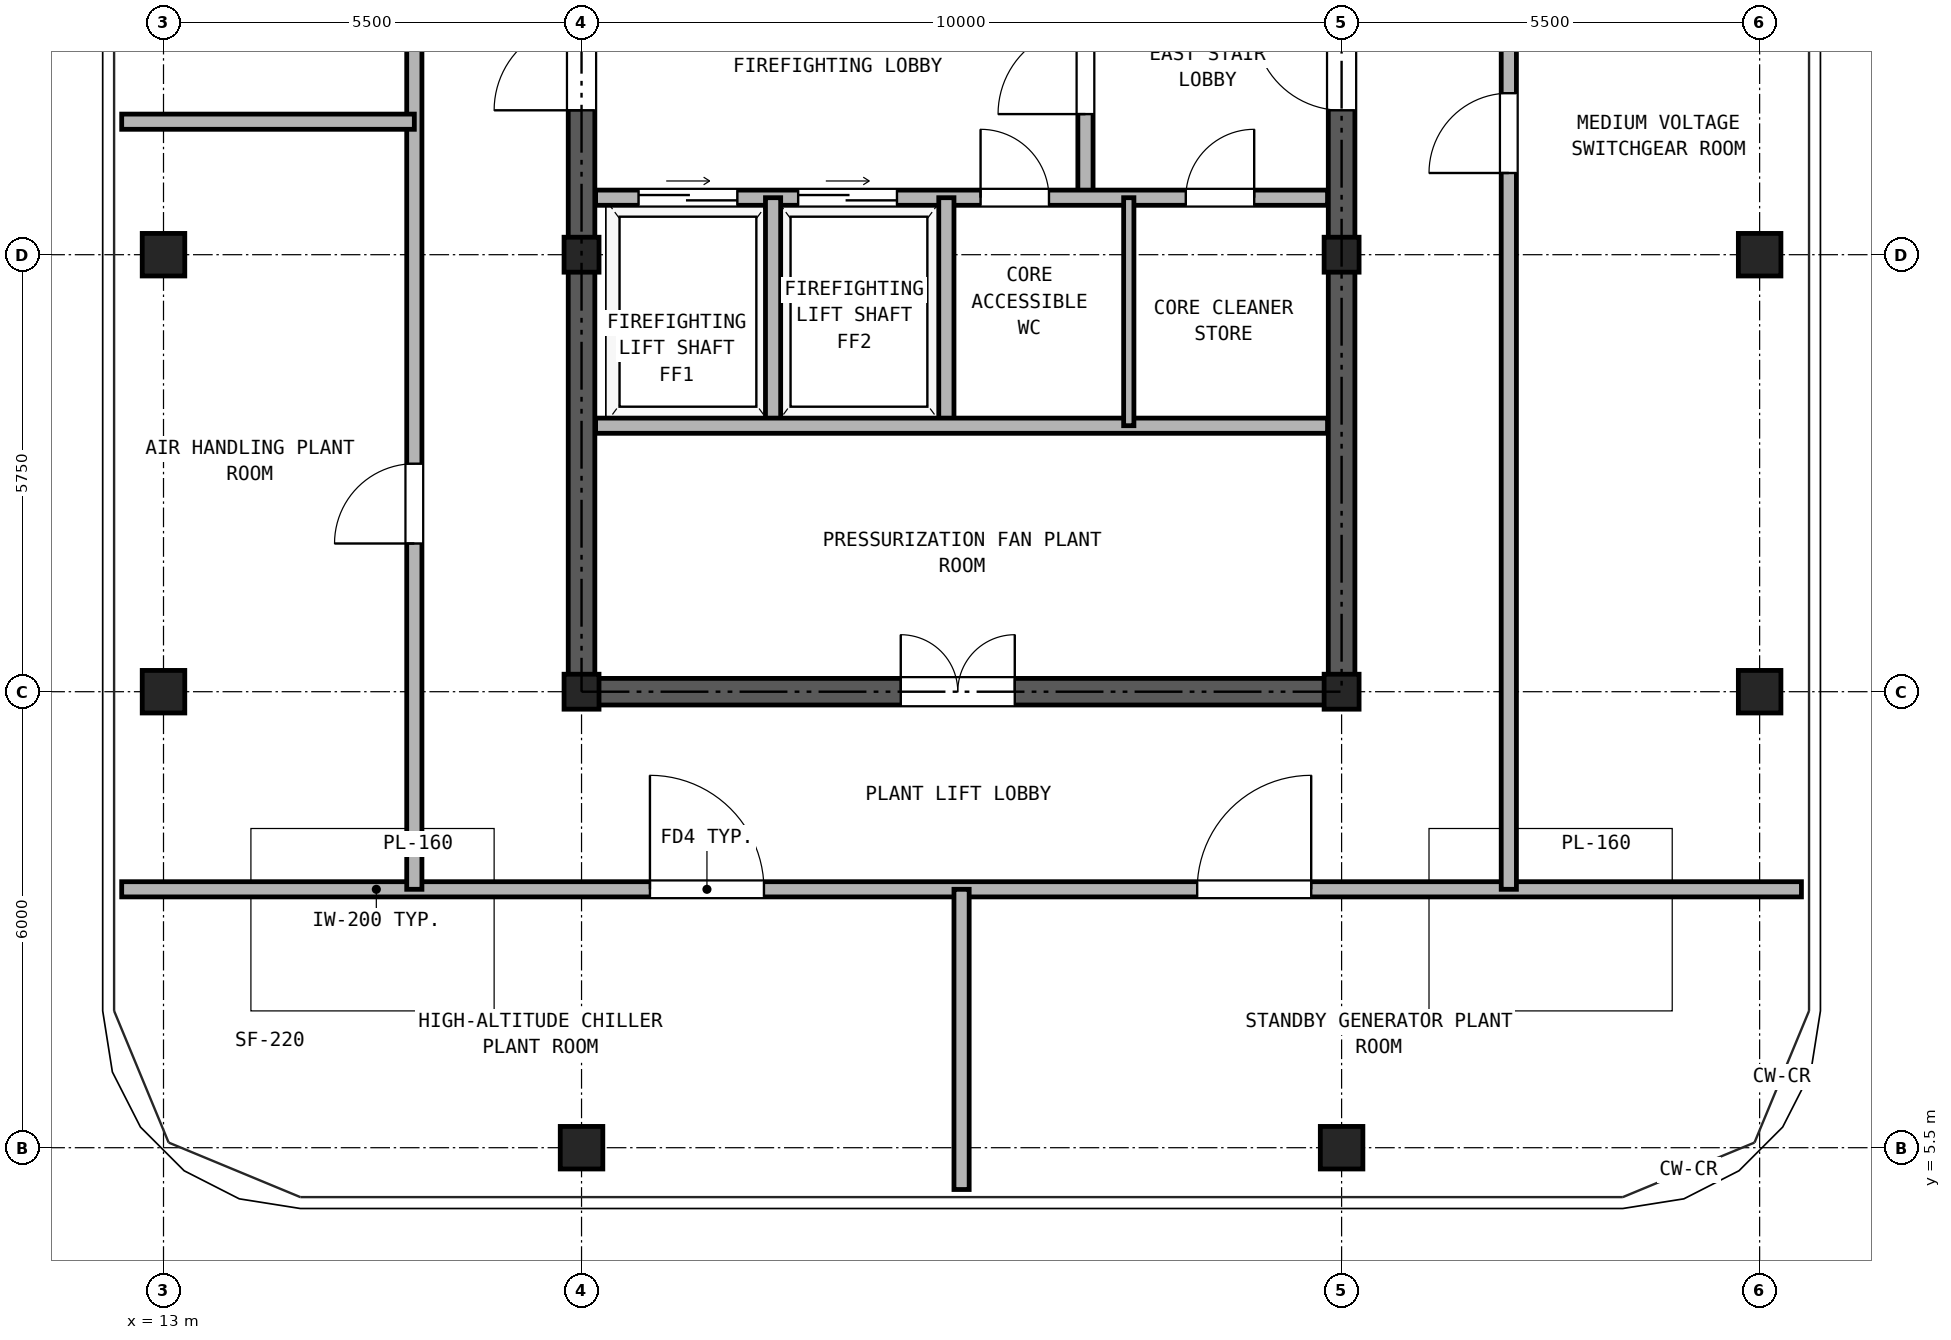
"""IFC4 building model, lengths in metres.
Left out: names, types, materials, properties, quantities, classifications, styles, units other than length and angle.
Written with IfcOpenShell. Run it as: python <this file> out.ifc"""

import sys

from ifc_helpers import new_model, si_unit, direction, frame, frame_2d, origin, origin_2d, place, context, subcontext, project, spatial, rectangle, hollow_rectangle, extrude, source, transform, mapped, element, fill, save


model = new_model("IFC4")
c1 = context("Model", 3, precision=1e-05, world=origin(), true_north=direction((0.0, 1.0)))
c2 = subcontext(c1, "Body", "Model", "MODEL_VIEW")
j1 = project(units=[si_unit("LENGTHUNIT", "METRE"), si_unit("PLANEANGLEUNIT", "RADIAN")], contexts=[c1])
p1 = place(None, origin())
s1 = spatial("IfcSite", under=j1, at=p1, CompositionType="ELEMENT")
p2 = place(p1, origin())
s2 = spatial("IfcBuilding", under=s1, at=p2, CompositionType="ELEMENT")
p3 = place(p2, frame((0.0, 0.0, 289.3)))
s3 = spatial("IfcBuildingStorey", under=s2, at=p3, CompositionType="ELEMENT", Elevation=289.3)
m1 = source(origin(), c2, "Body", "SweptSolid", [
    extrude(hollow_rectangle(XDim=0.56, YDim=0.56, WallThickness=0.03, at=origin_2d()), origin(), (0.0, 0.0, 1.0), 3.38),
])
for number, where, z_axis, x_axis in (
    (1, (18.5, 5.5, 0.0), (0.0, 0.0, 1.0), (1.0, 0.0, 0.0)),
    (2, (28.5, 5.5, 0.0), (0.0, 0.0, 1.0), (1.0, 0.0, 0.0)),
    (3, (13.0, 11.5, 0.0), (0.0, 0.0, 1.0), (1.0, 0.0, 0.0)),
    (4, (34.0, 11.5, 0.0), (0.0, 0.0, 1.0), (1.0, 0.0, 0.0)),
    (5, (13.0, 17.25, 0.0), (0.0, 0.0, 1.0), (1.0, 0.0, 0.0)),
    (6, (34.0, 17.25, 0.0), (0.0, 0.0, 1.0), (1.0, 0.0, 0.0)),
):
    element("IfcColumn", number, at=place(p3, frame(where, z_axis=z_axis, x_axis=x_axis)), inside=s3, PredefinedType="COLUMN", context=c2, shape_type="MappedRepresentation", body=[
        mapped(m1, transform((0.0, 0.0, 0.0), x_axis=(1.0, 0.0, 0.0), y_axis=(0.0, 1.0, 0.0), z_axis=(0.0, 0.0, 1.0), scale=1.0)),
    ])
m2 = source(origin(), c2, "Body", "SweptSolid", [
    extrude(hollow_rectangle(XDim=0.46, YDim=0.46, WallThickness=0.025, at=origin_2d()), origin(), (0.0, 0.0, 1.0), 3.38),
])
for number, where, z_axis, x_axis in (
    (7, (18.5, 11.5, 0.0), (0.0, 0.0, 1.0), (1.0, 0.0, 0.0)),
    (8, (18.5, 17.25, 0.0), (0.0, 0.0, 1.0), (1.0, 0.0, 0.0)),
    (9, (28.5, 11.5, 0.0), (0.0, 0.0, 1.0), (1.0, 0.0, 0.0)),
    (10, (28.5, 17.25, 0.0), (0.0, 0.0, 1.0), (1.0, 0.0, 0.0)),
):
    element("IfcColumn", number, at=place(p3, frame(where, z_axis=z_axis, x_axis=x_axis)), inside=s3, PredefinedType="COLUMN", context=c2, shape_type="MappedRepresentation", body=[
        mapped(m2, transform((0.0, 0.0, 0.0), x_axis=(1.0, 0.0, 0.0), y_axis=(0.0, 1.0, 0.0), z_axis=(0.0, 0.0, 1.0), scale=1.0)),
    ])
p4 = place(p3, frame((18.325, 11.5, 0.0), z_axis=(0.0, 0.0, 1.0), x_axis=(1.0, 0.0, 0.0)))
e11 = element("IfcWall", 11, at=p4, inside=s3, PredefinedType="SHEAR", context=c2, shape_type="SweptSolid", body=[
    extrude(rectangle(XDim=10.35, YDim=0.35, at=frame_2d((5.175, 0.0))), origin(), (0.0, 0.0, 1.0), 3.38),
])
p5 = place(p4, frame((4.375, 0.0, 0.0)))
e12 = element("IfcOpeningElement", 12, at=p5, cuts=e11, PredefinedType="OPENING", context=c2, shape_type="SweptSolid", body=[
    extrude(rectangle(XDim=1.5, YDim=2.25, at=frame_2d((0.75, 1.125))), frame((0.0, 0.185, 0.0), z_axis=(0.0, -1.0, 0.0), x_axis=(1.0, 0.0, 0.0)), (0.0, 0.0, 1.0), 0.37),
])
p6 = place(p3, frame((18.5, 11.675, 0.0), z_axis=(0.0, 0.0, 1.0), x_axis=(0.0, 1.0, 0.0)))
e13 = element("IfcWall", 13, at=p6, inside=s3, PredefinedType="SHEAR", context=c2, shape_type="SweptSolid", body=[
    extrude(rectangle(XDim=16.9, YDim=0.35, at=frame_2d((8.45, 0.0))), origin(), (0.0, 0.0, 1.0), 3.38),
])
p7 = place(p6, frame((7.475, 0.0, 0.0)))
e14 = element("IfcOpeningElement", 14, at=p7, cuts=e13, PredefinedType="OPENING", context=c2, shape_type="SweptSolid", body=[
    extrude(rectangle(XDim=1.15, YDim=2.2, at=frame_2d((0.575, 1.1))), frame((0.0, 0.185, 0.0), z_axis=(0.0, -1.0, 0.0), x_axis=(1.0, 0.0, 0.0)), (0.0, 0.0, 1.0), 0.37),
])
p8 = place(p3, frame((28.5, 11.675, 0.0), z_axis=(0.0, 0.0, 1.0), x_axis=(0.0, 1.0, 0.0)))
e15 = element("IfcWall", 15, at=p8, inside=s3, PredefinedType="SHEAR", context=c2, shape_type="SweptSolid", body=[
    extrude(rectangle(XDim=16.9, YDim=0.35, at=frame_2d((8.45, 0.0))), origin(), (0.0, 0.0, 1.0), 3.38),
])
p9 = place(p8, frame((7.475, 0.0, 0.0)))
e16 = element("IfcOpeningElement", 16, at=p9, cuts=e15, PredefinedType="OPENING", context=c2, shape_type="SweptSolid", body=[
    extrude(rectangle(XDim=1.15, YDim=2.2, at=frame_2d((0.575, 1.1))), frame((0.0, 0.185, 0.0), z_axis=(0.0, -1.0, 0.0), x_axis=(1.0, 0.0, 0.0)), (0.0, 0.0, 1.0), 0.37),
])
p10 = place(p3, frame((25.13, 18.0, 0.0), z_axis=(0.0, 0.0, 1.0), x_axis=(0.0, 1.0, 0.0)))
e17 = element("IfcWall", 17, at=p10, inside=s3, PredefinedType="PARTITIONING", context=c2, shape_type="SweptSolid", body=[
    extrude(rectangle(XDim=3.39, YDim=0.2, at=frame_2d((1.695, 0.0))), origin(), (0.0, 0.0, 1.0), 3.38),
])
p11 = place(p10, frame((1.1, 0.0, 0.0)))
e18 = element("IfcOpeningElement", 18, at=p11, cuts=e17, PredefinedType="OPENING", context=c2, shape_type="SweptSolid", body=[
    extrude(rectangle(XDim=1.15, YDim=2.2, at=frame_2d((0.575, 1.1))), frame((0.0, 0.11, 0.0), z_axis=(0.0, -1.0, 0.0), x_axis=(1.0, 0.0, 0.0)), (0.0, 0.0, 1.0), 0.22),
])
p12 = place(p3, frame((18.685, 18.0, 0.0), z_axis=(0.0, 0.0, 1.0), x_axis=(1.0, 0.0, 0.0)))
e19 = element("IfcWall", 19, at=p12, inside=s3, PredefinedType="PARTITIONING", context=c2, shape_type="SweptSolid", body=[
    extrude(rectangle(XDim=9.63, YDim=0.2, at=frame_2d((4.815, 0.0))), origin(), (0.0, 0.0, 1.0), 3.38),
])
p13 = place(p12, frame((0.565, 0.0, 0.0)))
e20 = element("IfcOpeningElement", 20, at=p13, cuts=e19, PredefinedType="OPENING", context=c2, shape_type="SweptSolid", body=[
    extrude(rectangle(XDim=1.3, YDim=2.3, at=frame_2d((0.65, 1.15))), frame((0.0, 0.11, 0.0), z_axis=(0.0, -1.0, 0.0), x_axis=(1.0, 0.0, 0.0)), (0.0, 0.0, 1.0), 0.22),
])
p14 = place(p12, frame((2.665, 0.0, 0.0)))
e21 = element("IfcOpeningElement", 21, at=p14, cuts=e19, PredefinedType="OPENING", context=c2, shape_type="SweptSolid", body=[
    extrude(rectangle(XDim=1.3, YDim=2.3, at=frame_2d((0.65, 1.15))), frame((0.0, 0.11, 0.0), z_axis=(0.0, -1.0, 0.0), x_axis=(1.0, 0.0, 0.0)), (0.0, 0.0, 1.0), 0.22),
])
p15 = place(p12, frame((5.065, 0.0, 0.0)))
e22 = element("IfcOpeningElement", 22, at=p15, cuts=e19, PredefinedType="OPENING", context=c2, shape_type="SweptSolid", body=[
    extrude(rectangle(XDim=0.9, YDim=2.05, at=frame_2d((0.45, 1.025))), frame((0.0, 0.11, 0.0), z_axis=(0.0, -1.0, 0.0), x_axis=(1.0, 0.0, 0.0)), (0.0, 0.0, 1.0), 0.22),
])
p16 = place(p12, frame((7.765, 0.0, 0.0)))
e23 = element("IfcOpeningElement", 23, at=p16, cuts=e19, PredefinedType="OPENING", context=c2, shape_type="SweptSolid", body=[
    extrude(rectangle(XDim=0.9, YDim=2.05, at=frame_2d((0.45, 1.025))), frame((0.0, 0.11, 0.0), z_axis=(0.0, -1.0, 0.0), x_axis=(1.0, 0.0, 0.0)), (0.0, 0.0, 1.0), 0.22),
])
for number, where, z_axis, x_axis in (
    (24, (21.02, 15.0, 0.0), (0.0, 0.0, 1.0), (0.0, 1.0, 0.0)),
    (25, (23.3, 15.0, 0.0), (0.0, 0.0, 1.0), (0.0, 1.0, 0.0)),
):
    element("IfcWall", number, at=place(p3, frame(where, z_axis=z_axis, x_axis=x_axis)), inside=s3, PredefinedType="PARTITIONING", context=c2, shape_type="SweptSolid", body=[
        extrude(rectangle(XDim=3.0, YDim=0.2, at=frame_2d((1.5, 0.0))), origin(), (0.0, 0.0, 1.0), 3.38),
    ])
p17 = place(p3, frame((18.685, 15.0, 0.0), z_axis=(0.0, 0.0, 1.0), x_axis=(1.0, 0.0, 0.0)))
e26 = element("IfcWall", 26, at=p17, inside=s3, PredefinedType="PARTITIONING", context=c2, shape_type="SweptSolid", body=[
    extrude(rectangle(XDim=9.63, YDim=0.2, at=frame_2d((4.815, 0.0))), origin(), (0.0, 0.0, 1.0), 3.38),
])
p18 = place(p3, frame((25.7, 15.0, 0.0), z_axis=(0.0, 0.0, 1.0), x_axis=(0.0, 1.0, 0.0)))
e27 = element("IfcWall", 27, at=p18, inside=s3, PredefinedType="PARTITIONING", context=c2, shape_type="SweptSolid", body=[
    extrude(rectangle(XDim=3.0, YDim=0.135, at=frame_2d((1.5, 0.0))), origin(), (0.0, 0.0, 1.0), 3.38),
])
p19 = place(p3, frame((12.45, 8.9, 0.0), z_axis=(0.0, 0.0, 1.0), x_axis=(1.0, 0.0, 0.0)))
e28 = element("IfcWall", 28, at=p19, inside=s3, PredefinedType="PARTITIONING", context=c2, shape_type="SweptSolid", body=[
    extrude(rectangle(XDim=22.1, YDim=0.2, at=frame_2d((11.05, 0.0))), origin(), (0.0, 0.0, 1.0), 3.38),
])
p20 = place(p19, frame((6.95, 0.0, 0.0)))
e29 = element("IfcOpeningElement", 29, at=p20, cuts=e28, PredefinedType="OPENING", context=c2, shape_type="SweptSolid", body=[
    extrude(rectangle(XDim=1.5, YDim=2.25, at=frame_2d((0.75, 1.125))), frame((0.0, 0.11, 0.0), z_axis=(0.0, -1.0, 0.0), x_axis=(1.0, 0.0, 0.0)), (0.0, 0.0, 1.0), 0.22),
])
p21 = place(p19, frame((14.15, 0.0, 0.0)))
e30 = element("IfcOpeningElement", 30, at=p21, cuts=e28, PredefinedType="OPENING", context=c2, shape_type="SweptSolid", body=[
    extrude(rectangle(XDim=1.5, YDim=2.25, at=frame_2d((0.75, 1.125))), frame((0.0, 0.11, 0.0), z_axis=(0.0, -1.0, 0.0), x_axis=(1.0, 0.0, 0.0)), (0.0, 0.0, 1.0), 0.22),
])
p22 = place(p3, frame((16.3, 8.9, 0.0), z_axis=(0.0, 0.0, 1.0), x_axis=(0.0, 1.0, 0.0)))
e31 = element("IfcWall", 31, at=p22, inside=s3, PredefinedType="PARTITIONING", context=c2, shape_type="SweptSolid", body=[
    extrude(rectangle(XDim=19.85, YDim=0.2, at=frame_2d((9.925, 0.0))), origin(), (0.0, 0.0, 1.0), 3.38),
])
p23 = place(p22, frame((4.55, 0.0, 0.0)))
e32 = element("IfcOpeningElement", 32, at=p23, cuts=e31, PredefinedType="OPENING", context=c2, shape_type="SweptSolid", body=[
    extrude(rectangle(XDim=1.05, YDim=2.15, at=frame_2d((0.525, 1.075))), frame((0.0, 0.11, 0.0), z_axis=(0.0, -1.0, 0.0), x_axis=(1.0, 0.0, 0.0)), (0.0, 0.0, 1.0), 0.22),
])
p24 = place(p22, frame((14.475, 0.0, 0.0)))
e33 = element("IfcOpeningElement", 33, at=p24, cuts=e31, PredefinedType="OPENING", context=c2, shape_type="SweptSolid", body=[
    extrude(rectangle(XDim=1.05, YDim=2.15, at=frame_2d((0.525, 1.075))), frame((0.0, 0.11, 0.0), z_axis=(0.0, -1.0, 0.0), x_axis=(1.0, 0.0, 0.0)), (0.0, 0.0, 1.0), 0.22),
])
p25 = place(p3, frame((30.7, 8.9, 0.0), z_axis=(0.0, 0.0, 1.0), x_axis=(0.0, 1.0, 0.0)))
e34 = element("IfcWall", 34, at=p25, inside=s3, PredefinedType="PARTITIONING", context=c2, shape_type="SweptSolid", body=[
    extrude(rectangle(XDim=19.85, YDim=0.2, at=frame_2d((9.925, 0.0))), origin(), (0.0, 0.0, 1.0), 3.38),
])
p26 = place(p25, frame((9.425, 0.0, 0.0)))
e35 = element("IfcOpeningElement", 35, at=p26, cuts=e34, PredefinedType="OPENING", context=c2, shape_type="SweptSolid", body=[
    extrude(rectangle(XDim=1.05, YDim=2.15, at=frame_2d((0.525, 1.075))), frame((0.0, 0.11, 0.0), z_axis=(0.0, -1.0, 0.0), x_axis=(1.0, 0.0, 0.0)), (0.0, 0.0, 1.0), 0.22),
])
p27 = place(p3, frame((23.5, 4.95, 0.0), z_axis=(0.0, 0.0, 1.0), x_axis=(0.0, 1.0, 0.0)))
e36 = element("IfcWall", 36, at=p27, inside=s3, PredefinedType="PARTITIONING", context=c2, shape_type="SweptSolid", body=[
    extrude(rectangle(XDim=3.95, YDim=0.2, at=frame_2d((1.975, 0.0))), origin(), (0.0, 0.0, 1.0), 3.38),
])
p28 = place(p3, frame((12.45, 19.0, 0.0), z_axis=(0.0, 0.0, 1.0), x_axis=(1.0, 0.0, 0.0)))
e37 = element("IfcWall", 37, at=p28, inside=s3, PredefinedType="PARTITIONING", context=c2, shape_type="SweptSolid", body=[
    extrude(rectangle(XDim=3.85, YDim=0.2, at=frame_2d((1.925, 0.0))), origin(), (0.0, 0.0, 1.0), 3.38),
])
p29 = place(p11, origin())
e38 = element("IfcDoor", 38, at=p29, inside=s3, OperationType="SINGLE_SWING_LEFT", PredefinedType="DOOR", context=c2, shape_type="SweptSolid", body=[
    extrude(rectangle(XDim=1.15, YDim=2.2, at=frame_2d((0.575, 1.1))), frame((0.0, 0.025, 0.0), z_axis=(0.0, -1.0, 0.0), x_axis=(1.0, 0.0, 0.0)), (0.0, 0.0, 1.0), 0.05),
])
fill(e18, e38)
p30 = place(p13, origin())
e39 = element("IfcDoor", 39, at=p30, inside=s3, OperationType="DOUBLE_DOOR_SLIDING", PredefinedType="DOOR", context=c2, shape_type="SweptSolid", body=[
    extrude(rectangle(XDim=1.3, YDim=2.3, at=frame_2d((0.65, 1.15))), frame((0.0, 0.025, 0.0), z_axis=(0.0, -1.0, 0.0), x_axis=(1.0, 0.0, 0.0)), (0.0, 0.0, 1.0), 0.05),
])
fill(e20, e39)
p31 = place(p14, origin())
e40 = element("IfcDoor", 40, at=p31, inside=s3, OperationType="DOUBLE_DOOR_SLIDING", PredefinedType="DOOR", context=c2, shape_type="SweptSolid", body=[
    extrude(rectangle(XDim=1.3, YDim=2.3, at=frame_2d((0.65, 1.15))), frame((0.0, 0.025, 0.0), z_axis=(0.0, -1.0, 0.0), x_axis=(1.0, 0.0, 0.0)), (0.0, 0.0, 1.0), 0.05),
])
fill(e21, e40)
p32 = place(p15, frame((0.9, 0.0, 0.0), z_axis=(0.0, 0.0, 1.0), x_axis=(-1.0, 0.0, 0.0)))
e41 = element("IfcDoor", 41, at=p32, inside=s3, OperationType="SINGLE_SWING_LEFT", PredefinedType="DOOR", context=c2, shape_type="SweptSolid", body=[
    extrude(rectangle(XDim=0.9, YDim=2.05, at=frame_2d((0.45, 1.025))), frame((0.0, 0.025, 0.0), z_axis=(0.0, -1.0, 0.0), x_axis=(1.0, 0.0, 0.0)), (0.0, 0.0, 1.0), 0.05),
])
fill(e22, e41)
p33 = place(p16, frame((0.9, 0.0, 0.0), z_axis=(0.0, 0.0, 1.0), x_axis=(-1.0, 0.0, 0.0)))
e42 = element("IfcDoor", 42, at=p33, inside=s3, OperationType="SINGLE_SWING_RIGHT", PredefinedType="DOOR", context=c2, shape_type="SweptSolid", body=[
    extrude(rectangle(XDim=0.9, YDim=2.05, at=frame_2d((0.45, 1.025))), frame((0.0, 0.025, 0.0), z_axis=(0.0, -1.0, 0.0), x_axis=(1.0, 0.0, 0.0)), (0.0, 0.0, 1.0), 0.05),
])
fill(e23, e42)
p34 = place(p7, frame((1.15, 0.0, 0.0), z_axis=(0.0, 0.0, 1.0), x_axis=(-1.0, 0.0, 0.0)))
e43 = element("IfcDoor", 43, at=p34, inside=s3, OperationType="SINGLE_SWING_LEFT", PredefinedType="DOOR", context=c2, shape_type="SweptSolid", body=[
    extrude(rectangle(XDim=1.15, YDim=2.2, at=frame_2d((0.575, 1.1))), frame((0.0, 0.025, 0.0), z_axis=(0.0, -1.0, 0.0), x_axis=(1.0, 0.0, 0.0)), (0.0, 0.0, 1.0), 0.05),
])
fill(e14, e43)
p35 = place(p9, origin())
e44 = element("IfcDoor", 44, at=p35, inside=s3, OperationType="SINGLE_SWING_RIGHT", PredefinedType="DOOR", context=c2, shape_type="SweptSolid", body=[
    extrude(rectangle(XDim=1.15, YDim=2.2, at=frame_2d((0.575, 1.1))), frame((0.0, 0.025, 0.0), z_axis=(0.0, -1.0, 0.0), x_axis=(1.0, 0.0, 0.0)), (0.0, 0.0, 1.0), 0.05),
])
fill(e16, e44)
p36 = place(p5, frame((1.5, 0.0, 0.0), z_axis=(0.0, 0.0, 1.0), x_axis=(-1.0, 0.0, 0.0)))
e45 = element("IfcDoor", 45, at=p36, inside=s3, OperationType="DOUBLE_DOOR_SINGLE_SWING", PredefinedType="DOOR", context=c2, shape_type="SweptSolid", body=[
    extrude(rectangle(XDim=1.5, YDim=2.25, at=frame_2d((0.75, 1.125))), frame((0.0, 0.025, 0.0), z_axis=(0.0, -1.0, 0.0), x_axis=(1.0, 0.0, 0.0)), (0.0, 0.0, 1.0), 0.05),
])
fill(e12, e45)
p37 = place(p20, frame((1.5, 0.0, 0.0), z_axis=(0.0, 0.0, 1.0), x_axis=(-1.0, 0.0, 0.0)))
e46 = element("IfcDoor", 46, at=p37, inside=s3, OperationType="SINGLE_SWING_LEFT", PredefinedType="DOOR", context=c2, shape_type="SweptSolid", body=[
    extrude(rectangle(XDim=1.5, YDim=2.25, at=frame_2d((0.75, 1.125))), frame((0.0, 0.025, 0.0), z_axis=(0.0, -1.0, 0.0), x_axis=(1.0, 0.0, 0.0)), (0.0, 0.0, 1.0), 0.05),
])
fill(e29, e46)
p38 = place(p21, frame((1.5, 0.0, 0.0), z_axis=(0.0, 0.0, 1.0), x_axis=(-1.0, 0.0, 0.0)))
e47 = element("IfcDoor", 47, at=p38, inside=s3, OperationType="SINGLE_SWING_RIGHT", PredefinedType="DOOR", context=c2, shape_type="SweptSolid", body=[
    extrude(rectangle(XDim=1.5, YDim=2.25, at=frame_2d((0.75, 1.125))), frame((0.0, 0.025, 0.0), z_axis=(0.0, -1.0, 0.0), x_axis=(1.0, 0.0, 0.0)), (0.0, 0.0, 1.0), 0.05),
])
fill(e30, e47)
p39 = place(p23, frame((1.05, 0.0, 0.0), z_axis=(0.0, 0.0, 1.0), x_axis=(-1.0, 0.0, 0.0)))
e48 = element("IfcDoor", 48, at=p39, inside=s3, OperationType="SINGLE_SWING_LEFT", PredefinedType="DOOR", context=c2, shape_type="SweptSolid", body=[
    extrude(rectangle(XDim=1.05, YDim=2.15, at=frame_2d((0.525, 1.075))), frame((0.0, 0.025, 0.0), z_axis=(0.0, -1.0, 0.0), x_axis=(1.0, 0.0, 0.0)), (0.0, 0.0, 1.0), 0.05),
])
fill(e32, e48)
p40 = place(p26, origin())
e49 = element("IfcDoor", 49, at=p40, inside=s3, OperationType="SINGLE_SWING_LEFT", PredefinedType="DOOR", context=c2, shape_type="SweptSolid", body=[
    extrude(rectangle(XDim=1.05, YDim=2.15, at=frame_2d((0.525, 1.075))), frame((0.0, 0.025, 0.0), z_axis=(0.0, -1.0, 0.0), x_axis=(1.0, 0.0, 0.0)), (0.0, 0.0, 1.0), 0.05),
])
fill(e35, e49)
save(model, sys.argv[1])
